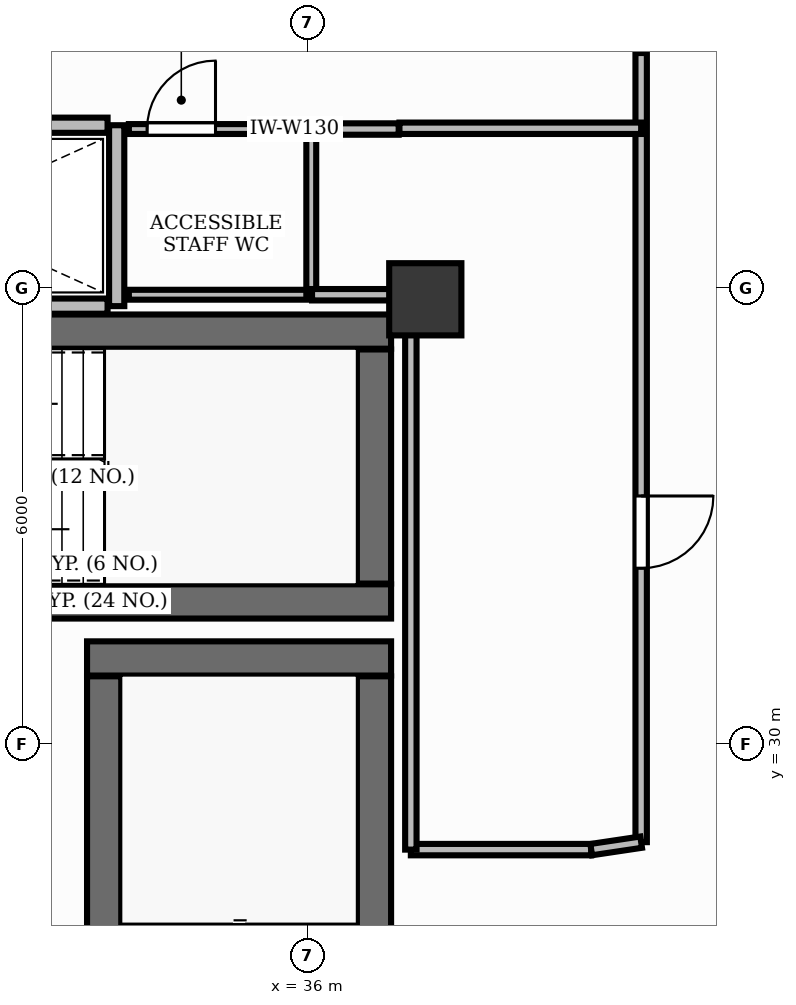
"""IFC4 building model, lengths in metres.
Left out: names, types, materials, properties, quantities, classifications, styles, units other than length and angle.
Written with IfcOpenShell. Run it as: python <this file> out.ifc"""

import sys

from ifc_helpers import new_model, si_unit, direction, frame, frame_2d, origin, origin_2d, place, context, subcontext, project, spatial, rectangle, extrude, element, fill, save


model = new_model("IFC4")
c1 = context("Model", 3, precision=1e-05, world=origin(), true_north=direction((0.0, 1.0)))
c2 = subcontext(c1, "Body", "Model", "MODEL_VIEW")
j1 = project(units=[si_unit("LENGTHUNIT", "METRE"), si_unit("PLANEANGLEUNIT", "RADIAN")], contexts=[c1])
p1 = place(None, origin())
s1 = spatial("IfcSite", under=j1, at=p1, CompositionType="ELEMENT")
p2 = place(p1, origin())
s2 = spatial("IfcBuilding", under=s1, at=p2, CompositionType="ELEMENT")
p3 = place(p2, frame((0.0, 0.0, 72.0)))
s3 = spatial("IfcBuildingStorey", under=s2, at=p3, CompositionType="ELEMENT", Elevation=72.0)
p4 = place(p3, frame((28.852, 35.425, 0.0), z_axis=(0.0, 0.0, 1.0), x_axis=(1.0, 0.0, 0.0)))
e1 = element("IfcWall", 1, at=p4, inside=s3, PredefinedType="SHEAR", context=c2, shape_type="SweptSolid", body=[
    extrude(rectangle(XDim=8.248, YDim=0.45, at=frame_2d((4.124, 0.0))), origin(), (0.0, 0.0, 1.0), 3.9),
])
p5 = place(p3, frame((28.35, 31.875, 0.0), z_axis=(0.0, 0.0, 1.0), x_axis=(1.0, 0.0, 0.0)))
e2 = element("IfcWall", 2, at=p5, inside=s3, PredefinedType="SHEAR", context=c2, shape_type="SweptSolid", body=[
    extrude(rectangle(XDim=8.75, YDim=0.45, at=frame_2d((4.375, 0.0))), origin(), (0.0, 0.0, 1.0), 3.9),
])
p6 = place(p3, frame((36.875, 32.11, 0.0), z_axis=(0.0, 0.0, 1.0), x_axis=(0.0, 1.0, 0.0)))
e3 = element("IfcWall", 3, at=p6, inside=s3, PredefinedType="SHEAR", context=c2, shape_type="SweptSolid", body=[
    extrude(rectangle(XDim=3.08, YDim=0.45, at=frame_2d((1.54, 0.0))), origin(), (0.0, 0.0, 1.0), 3.9),
])
p7 = place(p3, frame((33.1, 31.125, 0.0), z_axis=(0.0, 0.0, 1.0), x_axis=(1.0, 0.0, 0.0)))
e4 = element("IfcWall", 4, at=p7, inside=s3, PredefinedType="SHEAR", context=c2, shape_type="SweptSolid", body=[
    extrude(rectangle(XDim=4.0, YDim=0.45, at=frame_2d((2.0, 0.0))), origin(), (0.0, 0.0, 1.0), 3.9),
])
p8 = place(p3, frame((36.875, 23.11, 0.0), z_axis=(0.0, 0.0, 1.0), x_axis=(0.0, 1.0, 0.0)))
e5 = element("IfcWall", 5, at=p8, inside=s3, PredefinedType="SHEAR", context=c2, shape_type="SweptSolid", body=[
    extrude(rectangle(XDim=7.78, YDim=0.45, at=frame_2d((3.89, 0.0))), origin(), (0.0, 0.0, 1.0), 3.9),
])
p9 = place(p3, frame((33.325, 23.11, 0.0), z_axis=(0.0, 0.0, 1.0), x_axis=(0.0, 1.0, 0.0)))
e6 = element("IfcWall", 6, at=p9, inside=s3, PredefinedType="SHEAR", context=c2, shape_type="SweptSolid", body=[
    extrude(rectangle(XDim=7.78, YDim=0.45, at=frame_2d((3.89, 0.0))), origin(), (0.0, 0.0, 1.0), 3.9),
])
p10 = place(p9, frame((0.2, 0.0, 0.0)))
e7 = element("IfcOpeningElement", 7, at=p10, cuts=e6, PredefinedType="OPENING", context=c2, shape_type="SweptSolid", body=[
    extrude(rectangle(XDim=1.05, YDim=2.15, at=frame_2d((0.525, 1.075))), frame((0.0, 0.24, 0.0), z_axis=(0.0, -1.0, 0.0), x_axis=(1.0, 0.0, 0.0)), (0.0, 0.0, 1.0), 0.48),
])
p11 = place(p3, frame((37.55, 35.85, -0.0), z_axis=(0.0, 0.0, 1.0), x_axis=(1.0, 0.0, 0.0)))
e8 = element("IfcColumn", 8, at=p11, inside=s3, PredefinedType="PILASTER", context=c2, shape_type="SweptSolid", body=[
    extrude(rectangle(XDim=0.95, YDim=0.95, at=origin_2d()), origin(), (0.0, 0.0, 1.0), 3.901),
])
p12 = place(p3, frame((33.49, 35.76, 0.0), z_axis=(0.0, 0.0, 1.0), x_axis=(0.0, 1.0, 0.0)))
e9 = element("IfcWall", 9, at=p12, inside=s3, PredefinedType="PARTITIONING", context=c2, shape_type="SweptSolid", body=[
    extrude(rectangle(XDim=2.38, YDim=0.2, at=frame_2d((1.19, 0.0))), origin(), (0.0, 0.0, 1.0), 2.91),
])
for number, where, z_axis, x_axis in (
    (10, (28.8, 35.76, 0.0), (0.0, 0.0, 1.0), (1.0, 0.0, 0.0)),
    (11, (28.8, 38.14, 0.0), (0.0, 0.0, 1.0), (1.0, 0.0, 0.0)),
):
    element("IfcWall", number, at=place(p3, frame(where, z_axis=z_axis, x_axis=x_axis)), inside=s3, PredefinedType="PARTITIONING", context=c2, shape_type="SweptSolid", body=[
        extrude(rectangle(XDim=4.57, YDim=0.2, at=frame_2d((2.285, 0.0))), origin(), (0.0, 0.0, 1.0), 2.91),
    ])
p13 = place(p3, frame((33.65, 38.09, 0.0), z_axis=(0.0, 0.0, 1.0), x_axis=(1.0, 0.0, 0.0)))
e12 = element("IfcWall", 12, at=p13, inside=s3, PredefinedType="PARTITIONING", context=c2, shape_type="SweptSolid", body=[
    extrude(rectangle(XDim=2.4, YDim=0.13, at=frame_2d((1.2, 0.0))), origin(), (0.0, 0.0, 1.0), 2.91),
])
p14 = place(p13, frame((0.24, 0.0, 0.0)))
e13 = element("IfcOpeningElement", 13, at=p14, cuts=e12, PredefinedType="OPENING", context=c2, shape_type="SweptSolid", body=[
    extrude(rectangle(XDim=0.9, YDim=2.15, at=frame_2d((0.45, 1.075))), frame((0.0, 0.08, 0.0), z_axis=(0.0, -1.0, 0.0), x_axis=(1.0, 0.0, 0.0)), (0.0, 0.0, 1.0), 0.16),
])
p15 = place(p3, frame((40.39, 39.09, 0.0), z_axis=(0.0, 0.0, 1.0), x_axis=(0.0, -1.0, 0.0)))
e14 = element("IfcWall", 14, at=p15, inside=s3, PredefinedType="PARTITIONING", context=c2, shape_type="SweptSolid", body=[
    extrude(rectangle(XDim=10.382, YDim=0.15, at=frame_2d((5.191, 0.0))), origin(), (0.0, 0.0, 1.0), 2.91),
])
p16 = place(p15, frame((5.828, 0.0, 0.0)))
e15 = element("IfcOpeningElement", 15, at=p16, cuts=e14, PredefinedType="OPENING", context=c2, shape_type="SweptSolid", body=[
    extrude(rectangle(XDim=0.95, YDim=2.15, at=frame_2d((0.475, 1.075))), frame((0.0, 0.09, 0.0), z_axis=(0.0, -1.0, 0.0), x_axis=(1.0, 0.0, 0.0)), (0.0, 0.0, 1.0), 0.18),
])
p17 = place(p3, frame((36.05, 35.91, 0.0), z_axis=(0.0, 0.0, 1.0), x_axis=(-1.0, 0.0, 0.0)))
e16 = element("IfcWall", 16, at=p17, inside=s3, PredefinedType="PARTITIONING", context=c2, shape_type="SweptSolid", body=[
    extrude(rectangle(XDim=2.4, YDim=0.13, at=frame_2d((1.2, 0.0))), origin(), (0.0, 0.0, 1.0), 2.91),
])
p18 = place(p3, frame((36.05, 38.09, 0.0), z_axis=(0.0, 0.0, 1.0), x_axis=(0.0, -1.0, 0.0)))
e17 = element("IfcWall", 17, at=p18, inside=s3, PredefinedType="PARTITIONING", context=c2, shape_type="SweptSolid", body=[
    extrude(rectangle(XDim=2.18, YDim=0.13, at=frame_2d((1.09, 0.0))), origin(), (0.0, 0.0, 1.0), 2.91),
])
p19 = place(p3, frame((39.733, 28.61, 0.0), z_axis=(0.0, 0.0, 1.0), x_axis=(-1.0, 0.0, 0.0)))
e18 = element("IfcWall", 18, at=p19, inside=s3, PredefinedType="PARTITIONING", context=c2, shape_type="SweptSolid", body=[
    extrude(rectangle(XDim=2.373, YDim=0.15, at=frame_2d((1.187, 0.0))), origin(), (0.0, 0.0, 1.0), 2.91),
])
p20 = place(p3, frame((37.36, 28.61, 0.0), z_axis=(0.0, 0.0, 1.0), x_axis=(0.0, 1.0, 0.0)))
e19 = element("IfcWall", 19, at=p20, inside=s3, PredefinedType="PARTITIONING", context=c2, shape_type="SweptSolid", body=[
    extrude(rectangle(XDim=7.29, YDim=0.15, at=frame_2d((3.645, 0.0))), origin(), (0.0, 0.0, 1.0), 2.91),
])
p21 = place(p3, frame((37.35, 35.91, 0.0), z_axis=(0.0, 0.0, 1.0), x_axis=(-1.0, 0.0, 0.0)))
e20 = element("IfcWall", 20, at=p21, inside=s3, PredefinedType="PARTITIONING", context=c2, shape_type="SweptSolid", body=[
    extrude(rectangle(XDim=1.29, YDim=0.15, at=frame_2d((0.645, 0.0))), origin(), (0.0, 0.0, 1.0), 2.91),
])
p22 = place(p3, frame((36.06, 38.09, 0.0), z_axis=(0.0, 0.0, 1.0), x_axis=(1.0, 0.0, 0.0)))
e21 = element("IfcWall", 21, at=p22, inside=s3, PredefinedType="PARTITIONING", context=c2, shape_type="SweptSolid", body=[
    extrude(rectangle(XDim=1.14, YDim=0.15, at=frame_2d((0.57, 0.0))), origin(), (0.0, 0.0, 1.0), 2.91),
])
p23 = place(p3, frame((37.21, 38.1, 0.0), z_axis=(0.0, 0.0, 1.0), x_axis=(1.0, 0.0, 0.0)))
e22 = element("IfcWall", 22, at=p23, inside=s3, PredefinedType="PARTITIONING", context=c2, shape_type="SweptSolid", body=[
    extrude(rectangle(XDim=3.18, YDim=0.15, at=frame_2d((1.59, 0.0))), origin(), (0.0, 0.0, 1.0), 2.91),
])
p24 = place(p3, frame((40.39, 28.708, 0.0), z_axis=(0.0, 0.0, 1.0), x_axis=(-0.989025137229, -0.147747344915, 0.0)))
e23 = element("IfcWall", 23, at=p24, inside=s3, PredefinedType="PARTITIONING", context=c2, shape_type="SweptSolid", body=[
    extrude(rectangle(XDim=0.664, YDim=0.15, at=frame_2d((0.332, 0.0))), origin(), (0.0, 0.0, 1.0), 2.91),
])
p25 = place(p14, origin())
e24 = element("IfcDoor", 24, at=p25, inside=s3, OperationType="SINGLE_SWING_RIGHT", PredefinedType="DOOR", context=c2, shape_type="SweptSolid", body=[
    extrude(rectangle(XDim=0.9, YDim=2.15, at=frame_2d((0.45, 1.075))), frame((0.0, 0.025, 0.0), z_axis=(0.0, -1.0, 0.0), x_axis=(1.0, 0.0, 0.0)), (0.0, 0.0, 1.0), 0.05),
])
fill(e13, e24)
p26 = place(p16, origin())
e25 = element("IfcDoor", 25, at=p26, inside=s3, OperationType="SINGLE_SWING_LEFT", PredefinedType="DOOR", context=c2, shape_type="SweptSolid", body=[
    extrude(rectangle(XDim=0.95, YDim=2.15, at=frame_2d((0.475, 1.075))), frame((0.0, 0.025, 0.0), z_axis=(0.0, -1.0, 0.0), x_axis=(1.0, 0.0, 0.0)), (0.0, 0.0, 1.0), 0.05),
])
fill(e15, e25)
save(model, sys.argv[1])
